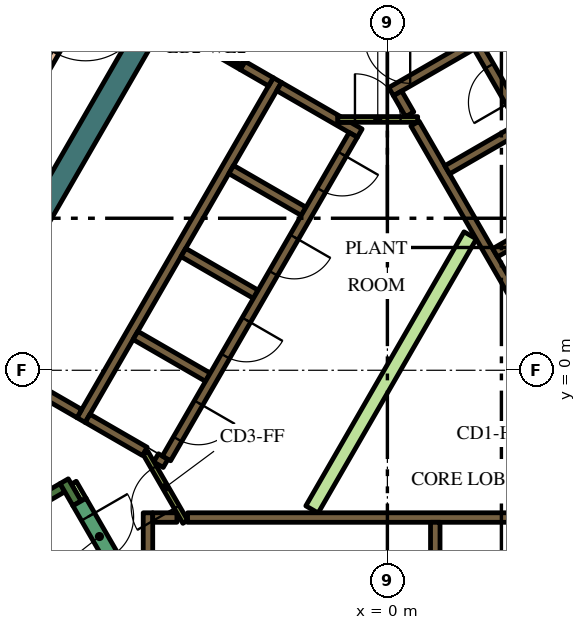
"""IFC4 building model, lengths in metres.
Left out: names, types, materials, properties, quantities, classifications, styles, units other than length and angle.
Written with IfcOpenShell. Run it as: python <this file> out.ifc"""

import sys

from ifc_helpers import new_model, si_unit, direction, frame, frame_2d, origin, origin_2d, place, context, subcontext, project, spatial, polyline, rectangle, outline, extrude, element, fill, save


model = new_model("IFC4")
c1 = context("Model", 3, precision=1e-05, world=origin(), true_north=direction((0.0, 1.0)))
c2 = subcontext(c1, "Body", "Model", "MODEL_VIEW")
j1 = project(units=[si_unit("LENGTHUNIT", "METRE"), si_unit("PLANEANGLEUNIT", "RADIAN")], contexts=[c1])
p1 = place(None, origin())
s1 = spatial("IfcSite", under=j1, at=p1, CompositionType="ELEMENT")
p2 = place(p1, origin())
s2 = spatial("IfcBuilding", under=s1, at=p2, CompositionType="ELEMENT")
p3 = place(p2, frame((0.0, 0.0, 344.4)))
s3 = spatial("IfcBuildingStorey", under=s2, at=p3, CompositionType="ELEMENT", Elevation=344.4)
p4 = place(p3, frame((-4.652, 11.842, 0.0), z_axis=(0.0, 0.0, 1.0), x_axis=(-0.500003640647, -0.866023301845, 0.0)))
e1 = element("IfcWall", 1, at=p4, inside=s3, PredefinedType="SOLIDWALL", context=c2, shape_type="SweptSolid", body=[
    extrude(rectangle(XDim=15.858, YDim=0.6, at=frame_2d((7.929, 0.0))), origin(), (0.0, 0.0, 1.0), 4.2),
])
p5 = place(p3, frame((-14.44, -6.49, 0.0), z_axis=(0.0, 0.0, 1.0), x_axis=(0.866022966069, 0.500004222222, 0.0)))
e2 = element("IfcWall", 2, at=p5, inside=s3, PredefinedType="SOLIDWALL", context=c2, shape_type="SweptSolid", body=[
    extrude(rectangle(XDim=6.8, YDim=0.25, at=frame_2d((3.4, 0.0))), origin(), (0.0, 0.0, 1.0), 4.2),
])
p6 = place(p3, frame((-8.168, -3.503, 0.0), z_axis=(0.0, 0.0, 1.0), x_axis=(-0.499952099219, 0.866053057547, 0.0)))
e3 = element("IfcWall", 3, at=p6, inside=s3, PredefinedType="SOLIDWALL", context=c2, shape_type="SweptSolid", body=[
    extrude(rectangle(XDim=0.675, YDim=0.25, at=frame_2d((0.337, 0.0))), origin(), (0.0, 0.0, 1.0), 4.2),
])
p7 = place(p3, frame((-5.259, -3.875, 0.0), z_axis=(0.0, 0.0, 1.0), x_axis=(1.0, 0.0, 0.0)))
e4 = element("IfcWall", 4, at=p7, inside=s3, PredefinedType="SOLIDWALL", context=c2, shape_type="SweptSolid", body=[
    extrude(rectangle(XDim=10.489, YDim=0.25, at=frame_2d((5.244, 0.0))), origin(), (0.0, 0.0, 1.0), 4.2),
])
p8 = place(p3, frame((1.26, -4.0, 0.0), z_axis=(0.0, 0.0, 1.0), x_axis=(0.0, -1.0, 0.0)))
e5 = element("IfcWall", 5, at=p8, inside=s3, PredefinedType="SOLIDWALL", context=c2, shape_type="SweptSolid", body=[
    extrude(rectangle(XDim=2.2, YDim=0.25, at=frame_2d((1.1, 0.0))), origin(), (0.0, 0.0, 1.0), 4.2),
])
p9 = place(p3, frame((-6.3, -7.125, 0.0), z_axis=(0.0, 0.0, 1.0), x_axis=(0.0, 1.0, 0.0)))
e6 = element("IfcWall", 6, at=p9, inside=s3, PredefinedType="SOLIDWALL", context=c2, shape_type="SweptSolid", body=[
    extrude(rectangle(XDim=3.375, YDim=0.25, at=frame_2d((1.687, 0.0))), origin(), (0.0, 0.0, 1.0), 4.2),
])
p10 = place(p3, frame((-6.175, -3.875, 0.0), z_axis=(0.0, 0.0, 1.0), x_axis=(1.0, 0.0, 0.0)))
e7 = element("IfcWall", 7, at=p10, inside=s3, PredefinedType="SOLIDWALL", context=c2, shape_type="SweptSolid", body=[
    extrude(rectangle(XDim=0.637, YDim=0.25, at=frame_2d((0.318, 0.0))), origin(), (0.0, 0.0, 1.0), 4.2),
])
p11 = place(p3, frame((3.647, 9.38, 0.0), z_axis=(0.0, 0.0, 1.0), x_axis=(-0.866027868628, -0.499995730742, 0.0)))
e8 = element("IfcWall", 8, at=p11, inside=s3, PredefinedType="SOLIDWALL", context=c2, shape_type="SweptSolid", body=[
    extrude(rectangle(XDim=4.099, YDim=0.25, at=frame_2d((2.049, 0.0))), origin(), (0.0, 0.0, 1.0), 4.2),
])
p12 = place(p3, frame((0.268, 7.285, 0.0), z_axis=(0.0, 0.0, 1.0), x_axis=(0.500098681536, -0.865968422476, 0.0)))
e9 = element("IfcWall", 9, at=p12, inside=s3, PredefinedType="SOLIDWALL", context=c2, shape_type="SweptSolid", body=[
    extrude(rectangle(XDim=0.636, YDim=0.25, at=frame_2d((0.318, 0.0))), origin(), (0.0, 0.0, 1.0), 4.2),
])
p13 = place(p3, frame((5.97, -2.591, 0.0), z_axis=(0.0, 0.0, 1.0), x_axis=(-0.499994469932, 0.866028596547, 0.0)))
e10 = element("IfcWall", 10, at=p13, inside=s3, PredefinedType="SOLIDWALL", context=c2, shape_type="SweptSolid", body=[
    extrude(rectangle(XDim=10.488, YDim=0.25, at=frame_2d((5.244, 0.0))), origin(), (0.0, 0.0, 1.0), 4.2),
])
p14 = place(p3, frame((1.574, 5.274, 0.0), z_axis=(0.0, 0.0, 1.0), x_axis=(0.866028486751, 0.499994660107, 0.0)))
e11 = element("IfcWall", 11, at=p14, inside=s3, PredefinedType="SOLIDWALL", context=c2, shape_type="SweptSolid", body=[
    extrude(rectangle(XDim=2.2, YDim=0.25, at=frame_2d((1.1, 0.0))), origin(), (0.0, 0.0, 1.0), 4.2),
])
p15 = place(p3, frame((2.834, 3.091, 0.0), z_axis=(0.0, 0.0, 1.0), x_axis=(0.866008176907, 0.50002983664, 0.0)))
e12 = element("IfcWall", 12, at=p15, inside=s3, PredefinedType="SOLIDWALL", context=c2, shape_type="SweptSolid", body=[
    extrude(rectangle(XDim=2.2, YDim=0.25, at=frame_2d((1.1, 0.0))), origin(), (0.0, 0.0, 1.0), 4.2),
])
p16 = place(p3, frame((-8.06, -1.311, 0.0), z_axis=(0.0, 0.0, 1.0), x_axis=(0.50000273126, 0.866023826885, 0.0)))
e13 = element("IfcWall", 13, at=p16, inside=s3, PredefinedType="SOLIDWALL", context=c2, shape_type="SweptSolid", body=[
    extrude(rectangle(XDim=10.33, YDim=0.25, at=frame_2d((5.165, 0.0))), origin(), (0.0, 0.0, 1.0), 4.2),
])
p17 = place(p3, origin())
e14 = element("IfcWall", 14, at=p17, inside=s3, PredefinedType="SOLIDWALL", context=c2, shape_type="SweptSolid", body=[
    extrude(outline(polyline([(-2.912, 7.356), (-2.787, 7.573), (-1.232, 6.675), (-1.303, 6.675), (-1.304, 6.675), (-1.304, 6.675), (-1.304, 6.525), (-1.304, 6.525), (-1.303, 6.525), (-0.971, 6.525), (-0.665, 6.348), (-0.79, 6.132), (-1.007, 6.257), (-1.007, 6.257), (-2.912, 7.356)])), origin(), (0.0, 0.0, 1.0), 4.2),
])
for number, where, z_axis, x_axis in (
    (15, (-2.204, 4.182, 0.0), (0.0, 0.0, 1.0), (-0.866, 0.5, 0.0)),
    (16, (-5.369, 3.1, 0.0), (0.0, 0.0, 1.0), (0.866, -0.5, 0.0)),
    (17, (-4.724, -0.182, 0.0), (0.0, 0.0, 1.0), (-0.866, 0.5, 0.0)),
):
    element("IfcWall", number, at=place(p3, frame(where, z_axis=z_axis, x_axis=x_axis)), inside=s3, PredefinedType="SOLIDWALL", context=c2, shape_type="SweptSolid", body=[
        extrude(rectangle(XDim=2.2, YDim=0.25, at=frame_2d((1.1, 0.0))), origin(), (0.0, 0.0, 1.0), 4.2),
    ])
p18 = place(p3, frame((-6.088, -2.305, 0.0), z_axis=(0.0, 0.0, 1.0), x_axis=(0.866059450854, -0.499941024108, 0.0)))
e18 = element("IfcWall", 18, at=p18, inside=s3, PredefinedType="SOLIDWALL", context=c2, shape_type="SweptSolid", body=[
    extrude(rectangle(XDim=0.29, YDim=0.25, at=frame_2d((0.145, 0.0))), origin(), (0.0, 0.0, 1.0), 4.2),
])
p19 = place(p3, frame((-7.889, -1.265, 0.0), z_axis=(0.0, 0.0, 1.0), x_axis=(0.865986741702, -0.500066958712, 0.0)))
e19 = element("IfcWall", 19, at=p19, inside=s3, PredefinedType="SOLIDWALL", context=c2, shape_type="SweptSolid", body=[
    extrude(rectangle(XDim=1.738, YDim=0.25, at=frame_2d((0.869, 0.0))), origin(), (0.0, 0.0, 1.0), 4.2),
])
p20 = place(p3, frame((-8.106, -1.14, 0.0), z_axis=(0.0, 0.0, 1.0), x_axis=(-0.866008981251, 0.500028443584, 0.0)))
e20 = element("IfcWall", 20, at=p20, inside=s3, PredefinedType="SOLIDWALL", context=c2, shape_type="SweptSolid", body=[
    extrude(rectangle(XDim=3.2, YDim=0.25, at=frame_2d((1.6, 0.0))), origin(), (0.0, 0.0, 1.0), 4.2),
])
p21 = place(p3, frame((-3.066, 7.59, 0.0), z_axis=(0.0, 0.0, 1.0), x_axis=(-0.866081358704, 0.49990307071, 0.0)))
e21 = element("IfcWall", 21, at=p21, inside=s3, PredefinedType="SOLIDWALL", context=c2, shape_type="SweptSolid", body=[
    extrude(rectangle(XDim=0.858, YDim=0.25, at=frame_2d((0.429, 0.0))), origin(), (0.0, 0.0, 1.0), 4.2),
])
e22 = element("IfcWall", 22, at=p17, inside=s3, PredefinedType="SOLIDWALL", context=c2, shape_type="SweptSolid", body=[
    extrude(outline(polyline([(-3.748, 8.128), (-3.813, 8.015), (-4.027, 8.139), (-4.017, 8.156), (-4.008, 8.173), (-4.0, 8.192), (-3.995, 8.21), (-3.991, 8.23), (-3.99, 8.25), (-3.99, 8.268), (-3.748, 8.128)])), origin(), (0.0, 0.0, 1.0), 4.2),
])
p22 = place(p3, frame((-8.252, -2.958, 0.0), z_axis=(0.0, 0.0, 1.0), x_axis=(0.500174715838, -0.865924508047, 0.0)))
e23 = element("IfcWall", 23, at=p22, inside=s3, PredefinedType="PARTITIONING", context=c2, shape_type="SweptSolid", body=[
    extrude(rectangle(XDim=0.514, YDim=0.15, at=frame_2d((0.257, 0.0))), origin(), (0.0, 0.0, 1.0), 3.3),
])
e24 = element("IfcWall", 24, at=p17, inside=s3, PredefinedType="PARTITIONING", context=c2, shape_type="SweptSolid", body=[
    extrude(outline(polyline([(2.017, 3.643), (2.342, 3.456), (-1.822, -3.756), (-2.147, -3.568), (2.017, 3.643)])), origin(), (0.0, 0.0, 1.0), 3.3),
])
p23 = place(p3, frame((8.565, -2.185, 0.0), z_axis=(0.0, 0.0, 1.0), x_axis=(-0.499997954832, 0.866026584559, 0.0)))
e25 = element("IfcWall", 25, at=p23, inside=s3, PredefinedType="SOLIDWALL", context=c2, shape_type="SweptSolid", body=[
    extrude(rectangle(XDim=12.35, YDim=0.25, at=frame_2d((6.175, 0.0))), origin(), (0.0, 0.0, 1.0), 4.2),
])
p24 = place(p23, frame((0.685, 0.0, 0.0)))
e26 = element("IfcOpeningElement", 26, at=p24, cuts=e25, PredefinedType="OPENING", context=c2, shape_type="SweptSolid", body=[
    extrude(rectangle(XDim=0.9, YDim=2.1, at=frame_2d((0.45, 1.05))), frame((0.0, 0.135, 0.0), z_axis=(0.0, -1.0, 0.0), x_axis=(1.0, 0.0, 0.0)), (0.0, 0.0, 1.0), 0.27),
])
p25 = place(p23, frame((3.105, 0.0, 0.0)))
e27 = element("IfcOpeningElement", 27, at=p25, cuts=e25, PredefinedType="OPENING", context=c2, shape_type="SweptSolid", body=[
    extrude(rectangle(XDim=1.1, YDim=2.1, at=frame_2d((0.55, 1.05))), frame((0.0, 0.135, 0.0), z_axis=(0.0, -1.0, 0.0), x_axis=(1.0, 0.0, 0.0)), (0.0, 0.0, 1.0), 0.27),
])
p26 = place(p23, frame((5.625, 0.0, 0.0)))
e28 = element("IfcOpeningElement", 28, at=p26, cuts=e25, PredefinedType="OPENING", context=c2, shape_type="SweptSolid", body=[
    extrude(rectangle(XDim=1.1, YDim=2.1, at=frame_2d((0.55, 1.05))), frame((0.0, 0.135, 0.0), z_axis=(0.0, -1.0, 0.0), x_axis=(1.0, 0.0, 0.0)), (0.0, 0.0, 1.0), 0.27),
])
p27 = place(p23, frame((8.145, 0.0, 0.0)))
e29 = element("IfcOpeningElement", 29, at=p27, cuts=e25, PredefinedType="OPENING", context=c2, shape_type="SweptSolid", body=[
    extrude(rectangle(XDim=1.1, YDim=2.1, at=frame_2d((0.55, 1.05))), frame((0.0, 0.135, 0.0), z_axis=(0.0, -1.0, 0.0), x_axis=(1.0, 0.0, 0.0)), (0.0, 0.0, 1.0), 0.27),
])
p28 = place(p23, frame((10.665, 0.0, 0.0)))
e30 = element("IfcOpeningElement", 30, at=p28, cuts=e25, PredefinedType="OPENING", context=c2, shape_type="SweptSolid", body=[
    extrude(rectangle(XDim=1.1, YDim=2.1, at=frame_2d((0.55, 1.05))), frame((0.0, 0.135, 0.0), z_axis=(0.0, -1.0, 0.0), x_axis=(1.0, 0.0, 0.0)), (0.0, 0.0, 1.0), 0.27),
])
p29 = place(p3, frame((-0.898, 6.194, 0.0), z_axis=(0.0, 0.0, 1.0), x_axis=(-0.499996202215, -0.866027596426, 0.0)))
e31 = element("IfcWall", 31, at=p29, inside=s3, PredefinedType="SOLIDWALL", context=c2, shape_type="SweptSolid", body=[
    extrude(rectangle(XDim=9.83, YDim=0.25, at=frame_2d((4.915, 0.0))), origin(), (0.0, 0.0, 1.0), 4.2),
])
p30 = place(p29, frame((0.585, 0.0, 0.0)))
e32 = element("IfcOpeningElement", 32, at=p30, cuts=e31, PredefinedType="OPENING", context=c2, shape_type="SweptSolid", body=[
    extrude(rectangle(XDim=1.1, YDim=2.1, at=frame_2d((0.55, 1.05))), frame((0.0, 0.135, 0.0), z_axis=(0.0, -1.0, 0.0), x_axis=(1.0, 0.0, 0.0)), (0.0, 0.0, 1.0), 0.27),
])
p31 = place(p29, frame((3.105, 0.0, 0.0)))
e33 = element("IfcOpeningElement", 33, at=p31, cuts=e31, PredefinedType="OPENING", context=c2, shape_type="SweptSolid", body=[
    extrude(rectangle(XDim=1.1, YDim=2.1, at=frame_2d((0.55, 1.05))), frame((0.0, 0.135, 0.0), z_axis=(0.0, -1.0, 0.0), x_axis=(1.0, 0.0, 0.0)), (0.0, 0.0, 1.0), 0.27),
])
p32 = place(p29, frame((5.625, 0.0, 0.0)))
e34 = element("IfcOpeningElement", 34, at=p32, cuts=e31, PredefinedType="OPENING", context=c2, shape_type="SweptSolid", body=[
    extrude(rectangle(XDim=1.1, YDim=2.1, at=frame_2d((0.55, 1.05))), frame((0.0, 0.135, 0.0), z_axis=(0.0, -1.0, 0.0), x_axis=(1.0, 0.0, 0.0)), (0.0, 0.0, 1.0), 0.27),
])
p33 = place(p29, frame((8.145, 0.0, 0.0)))
e35 = element("IfcOpeningElement", 35, at=p33, cuts=e31, PredefinedType="OPENING", context=c2, shape_type="SweptSolid", body=[
    extrude(rectangle(XDim=1.1, YDim=2.1, at=frame_2d((0.55, 1.05))), frame((0.0, 0.135, 0.0), z_axis=(0.0, -1.0, 0.0), x_axis=(1.0, 0.0, 0.0)), (0.0, 0.0, 1.0), 0.27),
])
p34 = place(p3, frame((-8.103, -3.466, 0.0), z_axis=(0.0, 0.0, 1.0), x_axis=(0.500078061341, -0.865980330357, 0.0)))
e36 = element("IfcWall", 36, at=p34, inside=s3, PredefinedType="SOLIDWALL", context=c2, shape_type="SweptSolid", body=[
    extrude(rectangle(XDim=2.1, YDim=0.4, at=frame_2d((1.05, 0.0))), origin(), (0.0, 0.0, 1.0), 4.2),
])
p35 = place(p34, frame((0.45, 0.0, 0.0)))
e37 = element("IfcOpeningElement", 37, at=p35, cuts=e36, PredefinedType="OPENING", context=c2, shape_type="SweptSolid", body=[
    extrude(rectangle(XDim=1.2, YDim=2.1, at=frame_2d((0.6, 1.05))), frame((0.0, 0.21, 0.0), z_axis=(0.0, -1.0, 0.0), x_axis=(1.0, 0.0, 0.0)), (0.0, 0.0, 1.0), 0.42),
])
p36 = place(p3, frame((-1.303, 6.6, 0.0), z_axis=(0.0, 0.0, 1.0), x_axis=(1.0, 0.0, 0.0)))
e38 = element("IfcWall", 38, at=p36, inside=s3, PredefinedType="PARTITIONING", context=c2, shape_type="SweptSolid", body=[
    extrude(rectangle(XDim=2.1, YDim=0.15, at=frame_2d((1.05, 0.0))), origin(), (0.0, 0.0, 1.0), 4.2),
])
p37 = place(p36, frame((0.45, 0.0, 0.0)))
e39 = element("IfcOpeningElement", 39, at=p37, cuts=e38, PredefinedType="OPENING", context=c2, shape_type="SweptSolid", body=[
    extrude(rectangle(XDim=1.2, YDim=2.1, at=frame_2d((0.6, 1.05))), frame((0.0, 0.085, 0.0), z_axis=(0.0, -1.0, 0.0), x_axis=(1.0, 0.0, 0.0)), (0.0, 0.0, 1.0), 0.17),
])
p38 = place(p3, frame((-5.317, -3.99, 0.0), z_axis=(0.0, 0.0, 1.0), x_axis=(-0.500027713859, 0.866009402589, 0.0)))
e40 = element("IfcWall", 40, at=p38, inside=s3, PredefinedType="PARTITIONING", context=c2, shape_type="SweptSolid", body=[
    extrude(rectangle(XDim=2.1, YDim=0.15, at=frame_2d((1.05, 0.0))), origin(), (0.0, 0.0, 1.0), 4.2),
])
p39 = place(p38, frame((0.45, 0.0, 0.0)))
e41 = element("IfcOpeningElement", 41, at=p39, cuts=e40, PredefinedType="OPENING", context=c2, shape_type="SweptSolid", body=[
    extrude(rectangle(XDim=1.2, YDim=2.1, at=frame_2d((0.6, 1.05))), frame((0.0, 0.085, 0.0), z_axis=(0.0, -1.0, 0.0), x_axis=(1.0, 0.0, 0.0)), (0.0, 0.0, 1.0), 0.17),
])
p40 = place(p3, frame((-5.659, 9.012, 0.0), z_axis=(0.0, 0.0, 1.0), x_axis=(0.866009402589, -0.500027713859, 0.0)))
e42 = element("IfcWall", 42, at=p40, inside=s3, PredefinedType="PARTITIONING", context=c2, shape_type="SweptSolid", body=[
    extrude(rectangle(XDim=2.1, YDim=0.12, at=frame_2d((1.05, 0.0))), origin(), (0.0, 0.0, 1.0), 3.3),
])
p41 = place(p40, frame((0.45, 0.0, 0.0)))
e43 = element("IfcOpeningElement", 43, at=p41, cuts=e42, PredefinedType="OPENING", context=c2, shape_type="SweptSolid", body=[
    extrude(rectangle(XDim=1.2, YDim=2.1, at=frame_2d((0.6, 1.05))), frame((0.0, 0.07, 0.0), z_axis=(0.0, -1.0, 0.0), x_axis=(1.0, 0.0, 0.0)), (0.0, 0.0, 1.0), 0.14),
])
p42 = place(p3, frame((-3.118, 18.1, 0.0), z_axis=(0.0, 0.0, 1.0), x_axis=(-0.499998496574, -0.866026271786, 0.0)))
e44 = element("IfcWall", 44, at=p42, inside=s3, PredefinedType="PARTITIONING", context=c2, shape_type="SweptSolid", body=[
    extrude(rectangle(XDim=20.9, YDim=0.2, at=frame_2d((10.45, 0.0))), origin(), (0.0, 0.0, 1.0), 3.3),
])
p43 = place(p42, frame((9.65, 0.0, 0.0)))
e45 = element("IfcOpeningElement", 45, at=p43, cuts=e44, PredefinedType="OPENING", context=c2, shape_type="SweptSolid", body=[
    extrude(rectangle(XDim=1.6, YDim=2.1, at=frame_2d((0.8, 1.05))), frame((0.0, 0.11, 0.0), z_axis=(0.0, -1.0, 0.0), x_axis=(1.0, 0.0, 0.0)), (0.0, 0.0, 1.0), 0.22),
])
p44 = place(p3, frame((-7.54, 16.64, 0.0), z_axis=(0.0, 0.0, 1.0), x_axis=(-0.500002158106, -0.866024157798, 0.0)))
e46 = element("IfcWall", 46, at=p44, inside=s3, PredefinedType="SOLIDWALL", context=c2, shape_type="SweptSolid", body=[
    extrude(rectangle(XDim=21.282, YDim=0.3, at=frame_2d((10.641, 0.0))), origin(), (0.0, 0.0, 1.0), 3.3),
])
p45 = place(p28, origin())
e47 = element("IfcDoor", 47, at=p45, inside=s3, OperationType="DOUBLE_DOOR_SLIDING", PredefinedType="DOOR", context=c2, shape_type="SweptSolid", body=[
    extrude(rectangle(XDim=1.1, YDim=2.1, at=frame_2d((0.55, 1.05))), frame((0.0, 0.025, 0.0), z_axis=(0.0, -1.0, 0.0), x_axis=(1.0, 0.0, 0.0)), (0.0, 0.0, 1.0), 0.05),
])
fill(e30, e47)
p46 = place(p30, origin())
e48 = element("IfcDoor", 48, at=p46, inside=s3, OperationType="DOUBLE_DOOR_SLIDING", PredefinedType="DOOR", context=c2, shape_type="SweptSolid", body=[
    extrude(rectangle(XDim=1.1, YDim=2.1, at=frame_2d((0.55, 1.05))), frame((0.0, 0.025, 0.0), z_axis=(0.0, -1.0, 0.0), x_axis=(1.0, 0.0, 0.0)), (0.0, 0.0, 1.0), 0.05),
])
fill(e32, e48)
p47 = place(p31, origin())
e49 = element("IfcDoor", 49, at=p47, inside=s3, OperationType="DOUBLE_DOOR_SLIDING", PredefinedType="DOOR", context=c2, shape_type="SweptSolid", body=[
    extrude(rectangle(XDim=1.1, YDim=2.1, at=frame_2d((0.55, 1.05))), frame((0.0, 0.025, 0.0), z_axis=(0.0, -1.0, 0.0), x_axis=(1.0, 0.0, 0.0)), (0.0, 0.0, 1.0), 0.05),
])
fill(e33, e49)
p48 = place(p32, origin())
e50 = element("IfcDoor", 50, at=p48, inside=s3, OperationType="DOUBLE_DOOR_SLIDING", PredefinedType="DOOR", context=c2, shape_type="SweptSolid", body=[
    extrude(rectangle(XDim=1.1, YDim=2.1, at=frame_2d((0.55, 1.05))), frame((0.0, 0.025, 0.0), z_axis=(0.0, -1.0, 0.0), x_axis=(1.0, 0.0, 0.0)), (0.0, 0.0, 1.0), 0.05),
])
fill(e34, e50)
p49 = place(p33, origin())
e51 = element("IfcDoor", 51, at=p49, inside=s3, OperationType="DOUBLE_DOOR_SLIDING", PredefinedType="DOOR", context=c2, shape_type="SweptSolid", body=[
    extrude(rectangle(XDim=1.1, YDim=2.1, at=frame_2d((0.55, 1.05))), frame((0.0, 0.025, 0.0), z_axis=(0.0, -1.0, 0.0), x_axis=(1.0, 0.0, 0.0)), (0.0, 0.0, 1.0), 0.05),
])
fill(e35, e51)
p50 = place(p35, origin())
e52 = element("IfcDoor", 52, at=p50, inside=s3, OperationType="SINGLE_SWING_LEFT", PredefinedType="DOOR", context=c2, shape_type="SweptSolid", body=[
    extrude(rectangle(XDim=1.2, YDim=2.1, at=frame_2d((0.6, 1.05))), frame((0.0, 0.025, 0.0), z_axis=(0.0, -1.0, 0.0), x_axis=(1.0, 0.0, 0.0)), (0.0, 0.0, 1.0), 0.05),
])
fill(e37, e52)
p51 = place(p37, origin())
e53 = element("IfcDoor", 53, at=p51, inside=s3, OperationType="SINGLE_SWING_LEFT", PredefinedType="DOOR", context=c2, shape_type="SweptSolid", body=[
    extrude(rectangle(XDim=1.2, YDim=2.1, at=frame_2d((0.6, 1.05))), frame((0.0, 0.025, 0.0), z_axis=(0.0, -1.0, 0.0), x_axis=(1.0, 0.0, 0.0)), (0.0, 0.0, 1.0), 0.05),
])
fill(e39, e53)
p52 = place(p39, origin())
e54 = element("IfcDoor", 54, at=p52, inside=s3, OperationType="SINGLE_SWING_LEFT", PredefinedType="DOOR", context=c2, shape_type="SweptSolid", body=[
    extrude(rectangle(XDim=1.2, YDim=2.1, at=frame_2d((0.6, 1.05))), frame((0.0, 0.025, 0.0), z_axis=(0.0, -1.0, 0.0), x_axis=(1.0, 0.0, 0.0)), (0.0, 0.0, 1.0), 0.05),
])
fill(e41, e54)
p53 = place(p41, origin())
e55 = element("IfcDoor", 55, at=p53, inside=s3, OperationType="SINGLE_SWING_LEFT", PredefinedType="DOOR", context=c2, shape_type="SweptSolid", body=[
    extrude(rectangle(XDim=1.2, YDim=2.1, at=frame_2d((0.6, 1.05))), frame((0.0, 0.025, 0.0), z_axis=(0.0, -1.0, 0.0), x_axis=(1.0, 0.0, 0.0)), (0.0, 0.0, 1.0), 0.05),
])
fill(e43, e55)
p54 = place(p43, origin())
e56 = element("IfcDoor", 56, at=p54, inside=s3, OperationType="DOUBLE_DOOR_SINGLE_SWING", PredefinedType="DOOR", context=c2, shape_type="SweptSolid", body=[
    extrude(rectangle(XDim=1.6, YDim=2.1, at=frame_2d((0.8, 1.05))), frame((0.0, 0.025, 0.0), z_axis=(0.0, -1.0, 0.0), x_axis=(1.0, 0.0, 0.0)), (0.0, 0.0, 1.0), 0.05),
])
fill(e45, e56)
p55 = place(p2, frame((0.0, 0.0, 348.6)))
p56 = place(p55, origin())
p57 = place(p56, frame((-10.695, -6.175, 0.0)))
p58 = place(p57, frame((0.0, 0.0, 1.15)))
e57 = element("IfcWindow", 57, at=p58, inside=s3, PartitioningType="SINGLE_PANEL", PredefinedType="WINDOW", context=c2, shape_type="SweptSolid", body=[
    extrude(rectangle(XDim=7.364, YDim=5.955, at=origin_2d()), origin(), (0.0, 0.0, 1.0), 0.05),
])
save(model, sys.argv[1])
